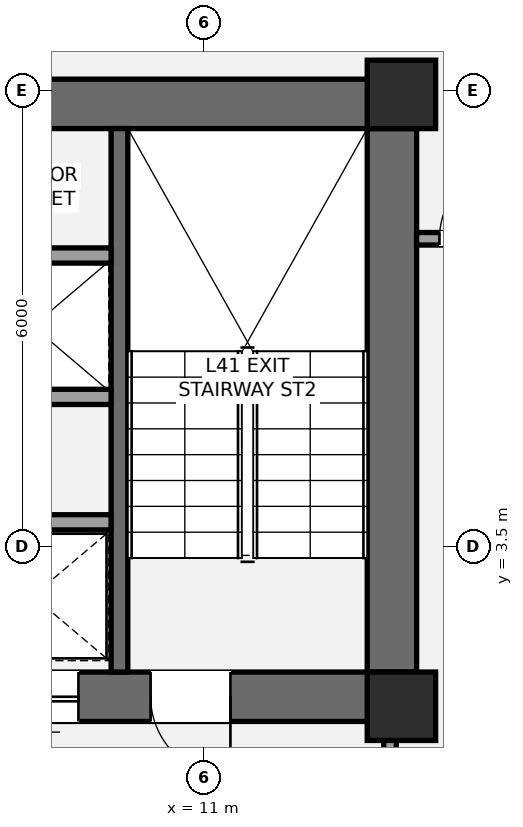
"""IFC4 building model, lengths in metres.
Left out: names, types, materials, properties, quantities, classifications, styles, units other than length and angle.
Written with IfcOpenShell. Run it as: python <this file> out.ifc"""

import sys

from ifc_helpers import new_model, si_unit, direction, frame, frame_2d, origin, origin_2d, place, context, subcontext, project, spatial, rectangle, extrude, element, fill, save


model = new_model("IFC4")
c1 = context("Model", 3, precision=1e-05, world=origin(), true_north=direction((0.0, 1.0)))
c2 = subcontext(c1, "Body", "Model", "MODEL_VIEW")
j1 = project(units=[si_unit("LENGTHUNIT", "METRE"), si_unit("PLANEANGLEUNIT", "RADIAN")], contexts=[c1])
p1 = place(None, origin())
s1 = spatial("IfcSite", under=j1, at=p1, CompositionType="ELEMENT")
p2 = place(p1, origin())
s2 = spatial("IfcBuilding", under=s1, at=p2, CompositionType="ELEMENT")
p3 = place(p2, frame((0.0, 0.0, 153.4)))
s3 = spatial("IfcBuildingStorey", under=s2, at=p3, CompositionType="ELEMENT", Elevation=153.4)
p4 = place(p3, frame((13.475, 1.2, 0.0), z_axis=(0.0, 0.0, 1.0), x_axis=(0.0, 1.0, 0.0)))
e1 = element("IfcWall", 1, at=p4, inside=s3, PredefinedType="SHEAR", context=c2, shape_type="SweptSolid", body=[
    extrude(rectangle(XDim=8.45, YDim=0.65, at=frame_2d((4.225, 0.0))), origin(), (0.0, 0.0, 1.0), 3.2),
])
p5 = place(p3, frame((4.475, 9.325, 0.0), z_axis=(0.0, 0.0, 1.0), x_axis=(1.0, 0.0, 0.0)))
e2 = element("IfcWall", 2, at=p5, inside=s3, PredefinedType="SHEAR", context=c2, shape_type="SweptSolid", body=[
    extrude(rectangle(XDim=9.325, YDim=0.65, at=frame_2d((4.663, 0.0))), origin(), (0.0, 0.0, 1.0), 3.2),
])
p6 = place(p3, frame((13.8, 1.525, 0.0), z_axis=(0.0, 0.0, 1.0), x_axis=(-1.0, 0.0, 0.0)))
e3 = element("IfcWall", 3, at=p6, inside=s3, PredefinedType="SHEAR", context=c2, shape_type="SweptSolid", body=[
    extrude(rectangle(XDim=8.925, YDim=0.65, at=frame_2d((4.462, 0.0))), origin(), (0.0, 0.0, 1.0), 3.2),
])
p7 = place(p6, frame((2.45, 0.0, 0.0)))
e4 = element("IfcOpeningElement", 4, at=p7, cuts=e3, PredefinedType="OPENING", context=c2, shape_type="SweptSolid", body=[
    extrude(rectangle(XDim=1.05, YDim=2.15, at=frame_2d((0.525, 1.075))), frame((0.0, 0.335, 0.0), z_axis=(0.0, -1.0, 0.0), x_axis=(1.0, 0.0, 0.0)), (0.0, 0.0, 1.0), 0.67),
])
p8 = place(p6, frame((4.45, 0.0, 0.0)))
e5 = element("IfcOpeningElement", 5, at=p8, cuts=e3, PredefinedType="OPENING", context=c2, shape_type="SweptSolid", body=[
    extrude(rectangle(XDim=1.1, YDim=2.2, at=frame_2d((0.55, 1.1))), frame((0.0, 0.335, 0.0), z_axis=(0.0, -1.0, 0.0), x_axis=(1.0, 0.0, 0.0)), (0.0, 0.0, 1.0), 0.67),
])
p9 = place(p3, frame((9.89, 1.85, 0.0), z_axis=(0.0, 0.0, 1.0), x_axis=(0.0, 1.0, 0.0)))
e6 = element("IfcWall", 6, at=p9, inside=s3, PredefinedType="SHEAR", context=c2, shape_type="SweptSolid", body=[
    extrude(rectangle(XDim=7.15, YDim=0.22, at=frame_2d((3.575, 0.0))), origin(), (0.0, 0.0, 1.0), 3.2),
])
for number, where, z_axis, x_axis in (
    (7, (13.6, 1.4, 0.0), (0.0, 0.0, 1.0), (1.0, 0.0, 0.0)),
    (8, (13.6, 9.45, 0.0), (0.0, 0.0, 1.0), (1.0, 0.0, 0.0)),
):
    element("IfcColumn", number, at=place(p3, frame(where, z_axis=z_axis, x_axis=x_axis)), inside=s3, PredefinedType="COLUMN", context=c2, shape_type="SweptSolid", body=[
        extrude(rectangle(XDim=0.9, YDim=0.9, at=origin_2d()), origin(), (0.0, 0.0, 1.0), 3.2),
    ])
p10 = place(p3, frame((13.45, -2.15, 0.0), z_axis=(0.0, 0.0, 1.0), x_axis=(0.0, 1.0, 0.0)))
e9 = element("IfcWall", 9, at=p10, inside=s3, PredefinedType="PARTITIONING", context=c2, shape_type="SweptSolid", body=[
    extrude(rectangle(XDim=3.4, YDim=0.165, at=frame_2d((1.7, 0.0))), origin(), (0.0, 0.0, 1.0), 2.473),
])
p11 = place(p10, frame((1.15, 0.0, 0.0)))
e10 = element("IfcOpeningElement", 10, at=p11, cuts=e9, PredefinedType="OPENING", context=c2, shape_type="SweptSolid", body=[
    extrude(rectangle(XDim=1.05, YDim=2.15, at=frame_2d((0.525, 1.075))), frame((0.0, 0.093, 0.0), z_axis=(0.0, -1.0, 0.0), x_axis=(1.0, 0.0, 0.0)), (0.0, 0.0, 1.0), 0.185),
])
p12 = place(p3, frame((5.525, 3.82, 0.0), z_axis=(0.0, 0.0, 1.0), x_axis=(1.0, 0.0, 0.0)))
e11 = element("IfcWall", 11, at=p12, inside=s3, PredefinedType="SOLIDWALL", context=c2, shape_type="SweptSolid", body=[
    extrude(rectangle(XDim=4.255, YDim=0.2, at=frame_2d((2.127, 0.0))), origin(), (0.0, 0.0, 1.0), 3.02),
])
p13 = place(p12, frame((0.65, 0.0, 0.0)))
e12 = element("IfcOpeningElement", 12, at=p13, cuts=e11, PredefinedType="OPENING", context=c2, shape_type="SweptSolid", body=[
    extrude(rectangle(XDim=1.2, YDim=2.2, at=frame_2d((0.6, 1.1))), frame((0.0, 0.11, 0.0), z_axis=(0.0, -1.0, 0.0), x_axis=(1.0, 0.0, 0.0)), (0.0, 0.0, 1.0), 0.22),
])
for number, where, z_axis, x_axis in (
    (13, (5.525, 5.47, 0.0), (0.0, 0.0, 1.0), (1.0, 0.0, 0.0)),
    (14, (5.525, 7.33, 0.0), (0.0, 0.0, 1.0), (1.0, 0.0, 0.0)),
):
    element("IfcWall", number, at=place(p3, frame(where, z_axis=z_axis, x_axis=x_axis)), inside=s3, PredefinedType="SOLIDWALL", context=c2, shape_type="SweptSolid", body=[
        extrude(rectangle(XDim=4.255, YDim=0.2, at=frame_2d((2.127, 0.0))), origin(), (0.0, 0.0, 1.0), 3.02),
    ])
p14 = place(p3, frame((13.8, 7.55, 0.0), z_axis=(0.0, 0.0, 1.0), x_axis=(1.0, 0.0, 0.0)))
e15 = element("IfcWall", 15, at=p14, inside=s3, PredefinedType="PARTITIONING", context=c2, shape_type="SweptSolid", body=[
    extrude(rectangle(XDim=1.75, YDim=0.165, at=frame_2d((0.875, 0.0))), origin(), (0.0, 0.0, 1.0), 3.02),
])
p15 = place(p14, frame((0.3, 0.0, 0.0)))
e16 = element("IfcOpeningElement", 16, at=p15, cuts=e15, PredefinedType="OPENING", context=c2, shape_type="SweptSolid", body=[
    extrude(rectangle(XDim=1.0, YDim=2.15, at=frame_2d((0.5, 1.075))), frame((0.0, 0.093, 0.0), z_axis=(0.0, -1.0, 0.0), x_axis=(1.0, 0.0, 0.0)), (0.0, 0.0, 1.0), 0.185),
])
p16 = place(p7, origin())
e17 = element("IfcDoor", 17, at=p16, inside=s3, OperationType="SINGLE_SWING_LEFT", PredefinedType="DOOR", context=c2, shape_type="SweptSolid", body=[
    extrude(rectangle(XDim=1.05, YDim=2.15, at=frame_2d((0.525, 1.075))), frame((0.0, 0.025, 0.0), z_axis=(0.0, -1.0, 0.0), x_axis=(1.0, 0.0, 0.0)), (0.0, 0.0, 1.0), 0.05),
])
fill(e4, e17)
p17 = place(p8, origin())
e18 = element("IfcDoor", 18, at=p17, inside=s3, OperationType="SLIDING_TO_LEFT", PredefinedType="DOOR", context=c2, shape_type="SweptSolid", body=[
    extrude(rectangle(XDim=1.1, YDim=2.2, at=frame_2d((0.55, 1.1))), frame((0.0, 0.025, 0.0), z_axis=(0.0, -1.0, 0.0), x_axis=(1.0, 0.0, 0.0)), (0.0, 0.0, 1.0), 0.05),
])
fill(e5, e18)
p18 = place(p15, origin())
e19 = element("IfcDoor", 19, at=p18, inside=s3, OperationType="SINGLE_SWING_RIGHT", PredefinedType="DOOR", context=c2, shape_type="SweptSolid", body=[
    extrude(rectangle(XDim=1.0, YDim=2.15, at=frame_2d((0.5, 1.075))), frame((0.0, 0.025, 0.0), z_axis=(0.0, -1.0, 0.0), x_axis=(1.0, 0.0, 0.0)), (0.0, 0.0, 1.0), 0.05),
])
fill(e16, e19)
save(model, sys.argv[1])
